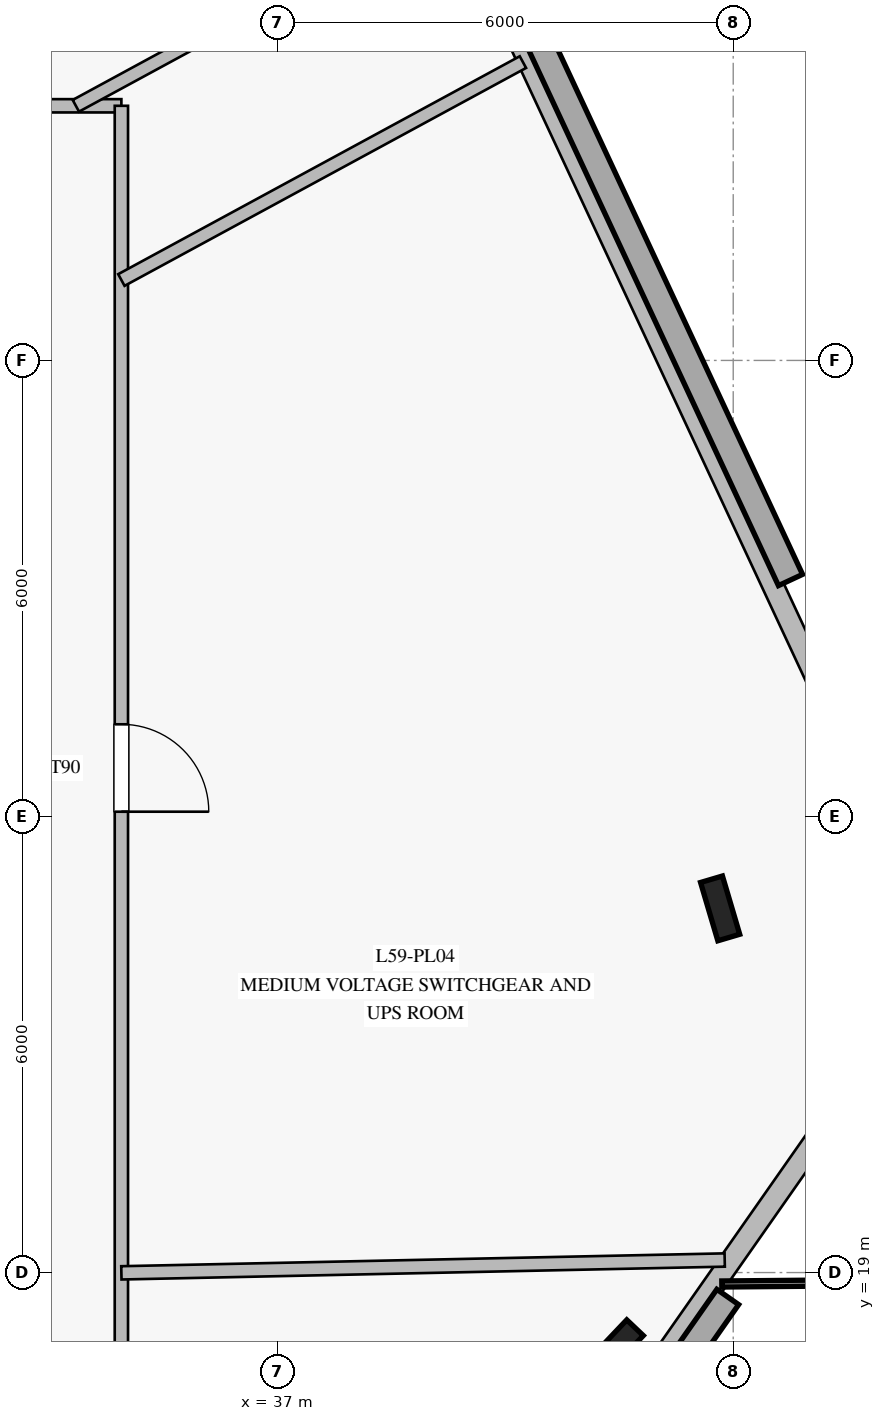
"""IFC4 building model, lengths in metres.
Left out: names, types, materials, properties, quantities, classifications, styles, units other than length and angle.
Written with IfcOpenShell. Run it as: python <this file> out.ifc"""

import sys

from ifc_helpers import new_model, si_unit, direction, frame, frame_2d, origin, origin_2d, place, context, subcontext, project, spatial, rectangle, i_section, extrude, element, fill, save


model = new_model("IFC4")
c1 = context("Model", 3, precision=1e-05, world=origin(), true_north=direction((0.0, 1.0)))
c2 = subcontext(c1, "Body", "Model", "MODEL_VIEW")
j1 = project(units=[si_unit("LENGTHUNIT", "METRE"), si_unit("PLANEANGLEUNIT", "RADIAN")], contexts=[c1])
p1 = place(None, origin())
s1 = spatial("IfcSite", under=j1, at=p1, CompositionType="ELEMENT")
p2 = place(p1, origin())
s2 = spatial("IfcBuilding", under=s1, at=p2, CompositionType="ELEMENT")
p3 = place(p2, frame((0.0, 0.0, 244.8)))
s3 = spatial("IfcBuildingStorey", under=s2, at=p3, CompositionType="ELEMENT", Elevation=244.8)
for number, where, z_axis, x_axis in (
    (1, (41.433, 17.984, 0.0), (0.0, 0.0, 1.0), (0.688, 0.725, 0.0)),
    (2, (42.828, 23.791, 0.0), (0.0, 0.0, 1.0), (-0.284, 0.959, 0.0)),
):
    element("IfcColumn", number, at=place(p3, frame(where, z_axis=z_axis, x_axis=x_axis)), inside=s3, PredefinedType="COLUMN", context=c2, shape_type="SweptSolid", body=[
        extrude(i_section(OverallWidth=0.3, OverallDepth=0.8, WebThickness=0.018, FlangeThickness=0.033, at=origin_2d()), origin(), (0.0, 0.0, 1.0), 5.4),
    ])
p4 = place(p3, frame((35.299, 8.201, 0.0), z_axis=(0.0, 0.0, 1.0), x_axis=(0.573547879244, 0.819172039449, 0.0)))
e3 = element("IfcWall", 3, at=p4, inside=s3, PredefinedType="STANDARD", context=c2, shape_type="SweptSolid", body=[
    extrude(rectangle(XDim=15.708, YDim=0.28, at=frame_2d((7.854, 0.0))), origin(), (0.0, 0.0, 1.0), 5.18),
])
p5 = place(p3, frame((44.698, 25.519, 0.0), z_axis=(0.0, 0.0, 1.0), x_axis=(-0.422651460509, 0.906292305456, 0.0)))
e4 = element("IfcWall", 4, at=p5, inside=s3, PredefinedType="STANDARD", context=c2, shape_type="SweptSolid", body=[
    extrude(rectangle(XDim=15.708, YDim=0.28, at=frame_2d((7.854, 0.0))), origin(), (0.0, 0.0, 1.0), 5.18),
])
p6 = place(p3, frame((15.05, 34.35, 0.0), z_axis=(0.0, 0.0, 1.0), x_axis=(1.0, 0.0, 0.0)))
e5 = element("IfcWall", 5, at=p6, inside=s3, PredefinedType="PARTITIONING", context=c2, shape_type="SweptSolid", body=[
    extrude(rectangle(XDim=19.9, YDim=0.175, at=frame_2d((9.95, 0.0))), origin(), (0.0, 0.0, 1.0), 3.78),
])
p7 = place(p6, frame((14.073, 0.0, 0.0)))
e6 = element("IfcOpeningElement", 6, at=p7, cuts=e5, PredefinedType="OPENING", context=c2, shape_type="SweptSolid", body=[
    extrude(rectangle(XDim=1.15, YDim=2.2, at=frame_2d((0.575, 1.1))), frame((0.0, 0.098, 0.0), z_axis=(0.0, -1.0, 0.0), x_axis=(1.0, 0.0, 0.0)), (0.0, 0.0, 1.0), 0.195),
])
p8 = place(p6, frame((4.477, 0.0, 0.0)))
e7 = element("IfcOpeningElement", 7, at=p8, cuts=e5, PredefinedType="OPENING", context=c2, shape_type="SweptSolid", body=[
    extrude(rectangle(XDim=1.15, YDim=2.2, at=frame_2d((0.575, 1.1))), frame((0.0, 0.098, 0.0), z_axis=(0.0, -1.0, 0.0), x_axis=(1.0, 0.0, 0.0)), (0.0, 0.0, 1.0), 0.195),
])
p9 = place(p3, frame((34.95, 34.35, 0.0), z_axis=(0.0, 0.0, 1.0), x_axis=(0.0, -1.0, 0.0)))
e8 = element("IfcWall", 8, at=p9, inside=s3, PredefinedType="PARTITIONING", context=c2, shape_type="SweptSolid", body=[
    extrude(rectangle(XDim=18.7, YDim=0.175, at=frame_2d((9.35, 0.0))), origin(), (0.0, 0.0, 1.0), 3.78),
])
p10 = place(p9, frame((8.137, 0.0, 0.0)))
e9 = element("IfcOpeningElement", 9, at=p10, cuts=e8, PredefinedType="OPENING", context=c2, shape_type="SweptSolid", body=[
    extrude(rectangle(XDim=1.15, YDim=2.2, at=frame_2d((0.575, 1.1))), frame((0.0, 0.098, 0.0), z_axis=(0.0, -1.0, 0.0), x_axis=(1.0, 0.0, 0.0)), (0.0, 0.0, 1.0), 0.195),
])
p11 = place(p3, frame((34.95, 18.996, 0.0), z_axis=(0.0, 0.0, 1.0), x_axis=(0.9997735909, 0.021278320874, 0.0)))
e10 = element("IfcWall", 10, at=p11, inside=s3, PredefinedType="PARTITIONING", context=c2, shape_type="SweptSolid", body=[
    extrude(rectangle(XDim=7.94, YDim=0.175, at=frame_2d((3.97, 0.0))), origin(), (0.0, 0.0, 1.0), 3.78),
])
p12 = place(p3, frame((34.95, 32.058, 0.0), z_axis=(0.0, 0.0, 1.0), x_axis=(0.878919599329, 0.476969954939, 0.0)))
e11 = element("IfcWall", 11, at=p12, inside=s3, PredefinedType="PARTITIONING", context=c2, shape_type="SweptSolid", body=[
    extrude(rectangle(XDim=6.011, YDim=0.175, at=frame_2d((3.005, 0.0))), origin(), (0.0, 0.0, 1.0), 3.78),
])
p13 = place(p3, frame((34.351, 34.35, 0.0), z_axis=(0.0, 0.0, 1.0), x_axis=(0.878891138972, 0.477022395529, 0.0)))
e12 = element("IfcWall", 12, at=p13, inside=s3, PredefinedType="PARTITIONING", context=c2, shape_type="SweptSolid", body=[
    extrude(rectangle(XDim=5.584, YDim=0.175, at=frame_2d((2.792, 0.0))), origin(), (0.0, 0.0, 1.0), 3.78),
])
p14 = place(p10, origin())
e13 = element("IfcDoor", 13, at=p14, inside=s3, OperationType="SINGLE_SWING_RIGHT", PredefinedType="DOOR", context=c2, shape_type="SweptSolid", body=[
    extrude(rectangle(XDim=1.15, YDim=2.2, at=frame_2d((0.575, 1.1))), frame((0.0, 0.025, 0.0), z_axis=(0.0, -1.0, 0.0), x_axis=(1.0, 0.0, 0.0)), (0.0, 0.0, 1.0), 0.05),
])
fill(e9, e13)
save(model, sys.argv[1])
